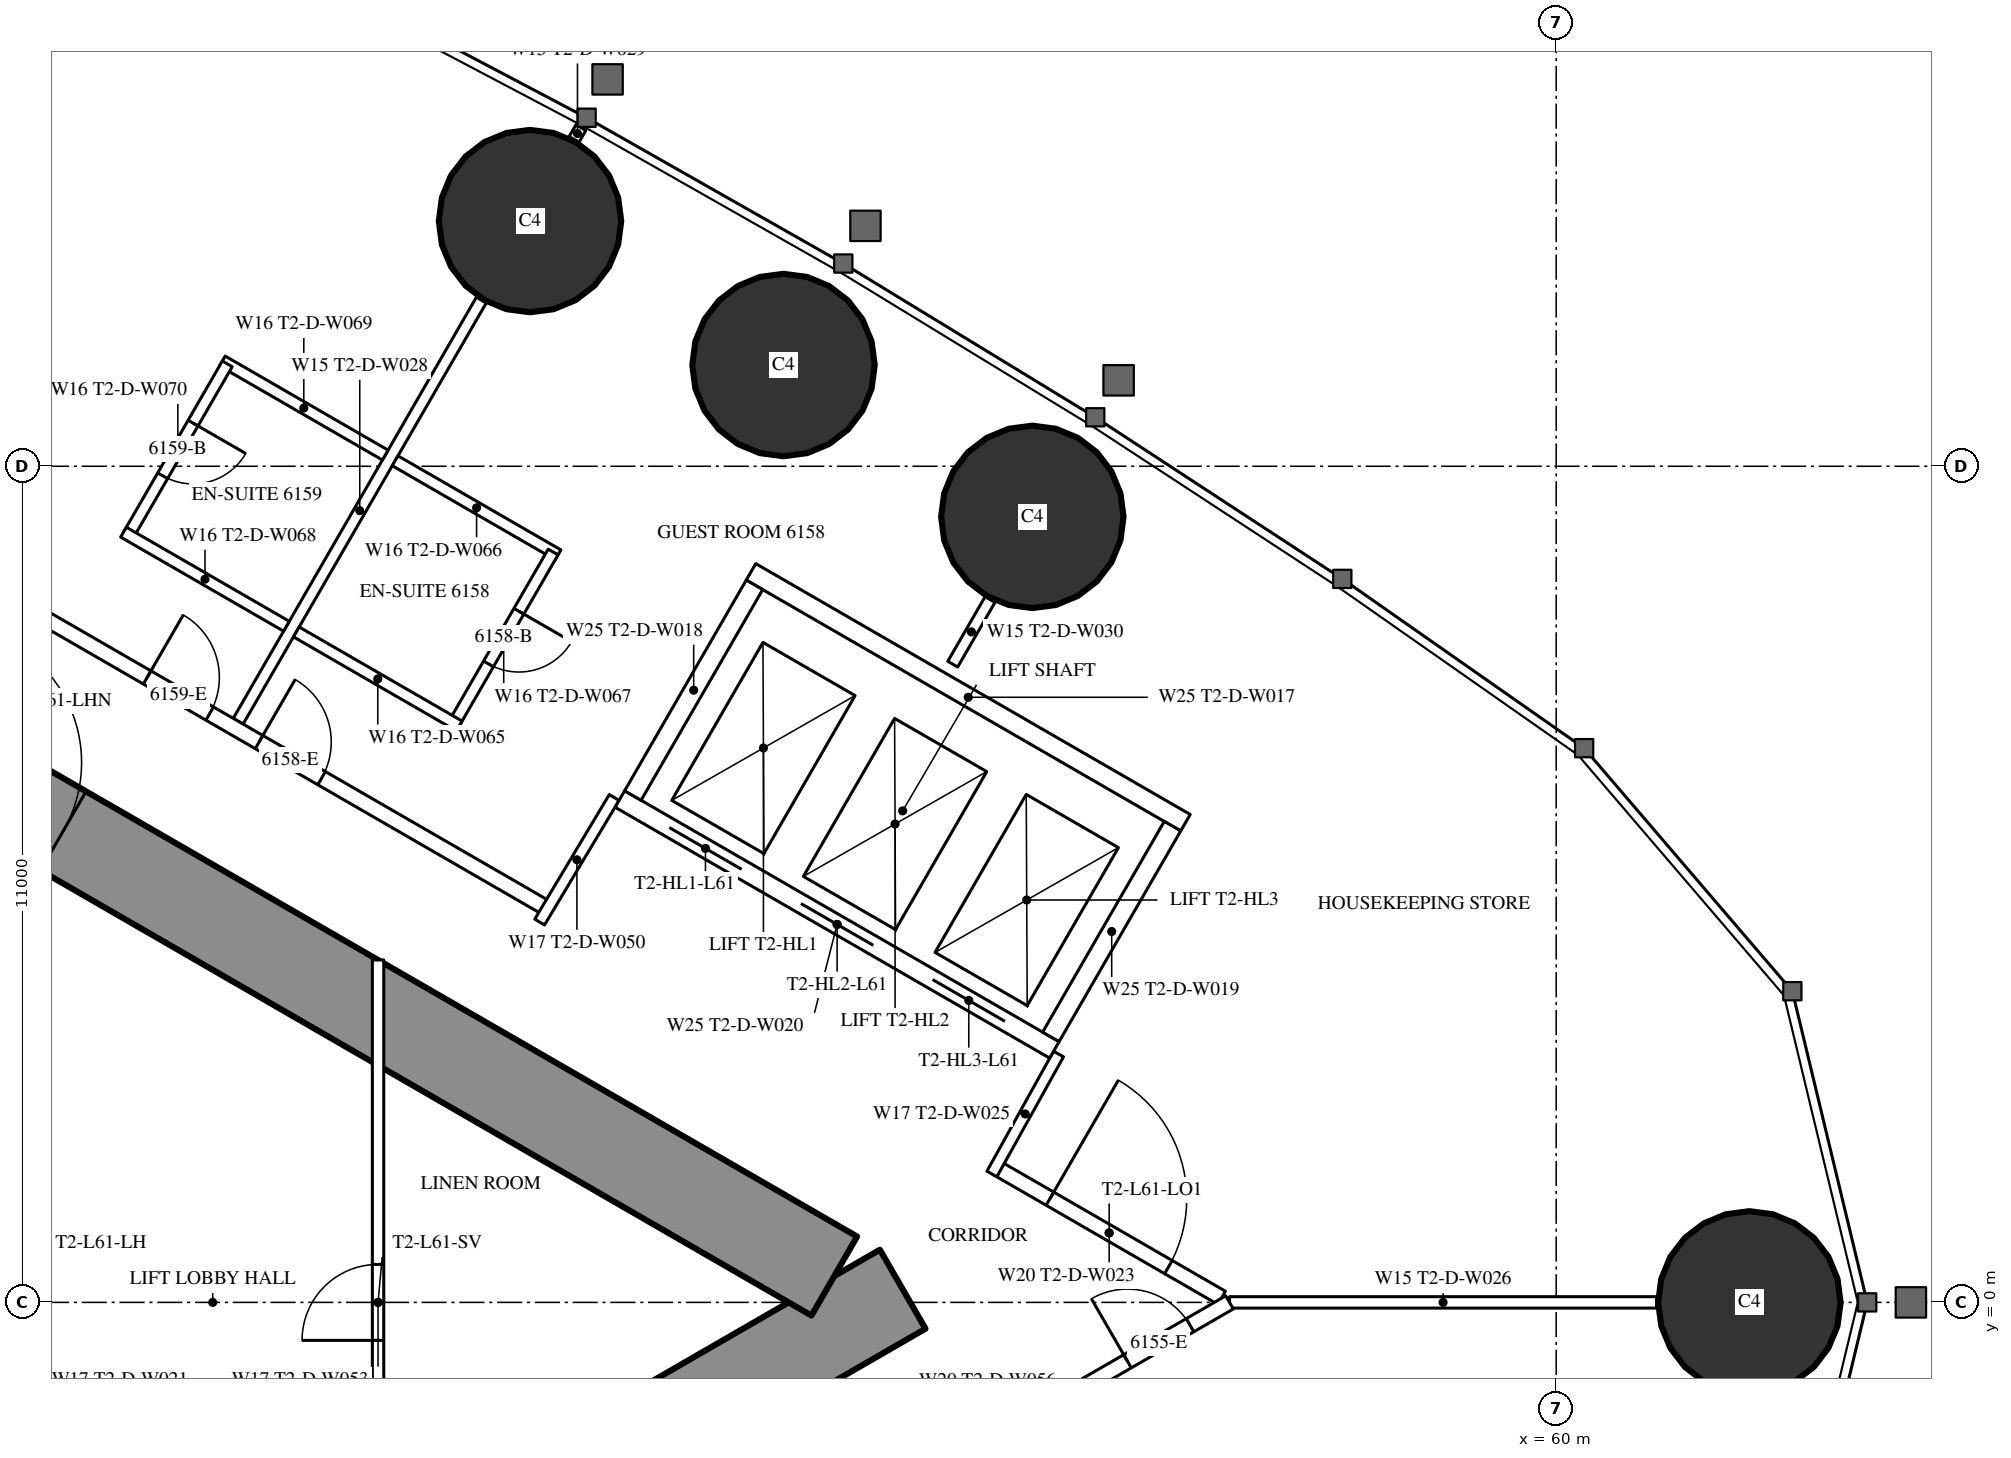
"""IFC4 building model, lengths in metres.
Left out: names, types, materials, properties, quantities, classifications, styles, units other than length and angle.
Written with IfcOpenShell. Run it as: python <this file> out.ifc"""

import sys

from ifc_helpers import new_model, si_unit, direction, frame, frame_2d, origin, origin_2d, place, context, subcontext, project, spatial, rectangle, circle, extrude, element, fill, save


model = new_model("IFC4")
c1 = context("Model", 3, precision=1e-05, world=origin(), true_north=direction((0.0, 1.0)))
c2 = subcontext(c1, "Body", "Model", "MODEL_VIEW")
j1 = project(units=[si_unit("LENGTHUNIT", "METRE"), si_unit("PLANEANGLEUNIT", "RADIAN")], contexts=[c1])
p1 = place(None, origin())
s1 = spatial("IfcSite", under=j1, at=p1, CompositionType="ELEMENT")
p2 = place(p1, origin())
s2 = spatial("IfcBuilding", under=s1, at=p2, CompositionType="ELEMENT")
p3 = place(p2, frame((0.0, 0.0, 229.7)))
s3 = spatial("IfcBuildingStorey", under=s2, at=p3, CompositionType="ELEMENT", Elevation=229.7)
for number, where, z_axis, x_axis in (
    (1, (62.542, 0.0, 0.0), (0.0, 0.0, 1.0), (1.0, 0.0, 0.0)),
    (2, (53.108, 10.334, 0.0), (0.0, 0.0, 1.0), (1.0, 0.0, 0.0)),
    (3, (49.834, 12.332, 0.0), (0.0, 0.0, 1.0), (1.0, 0.0, 0.0)),
    (4, (46.499, 14.226, 0.0), (0.0, 0.0, 1.0), (1.0, 0.0, 0.0)),
):
    element("IfcColumn", number, at=place(p3, frame(where, z_axis=z_axis, x_axis=x_axis)), inside=s3, PredefinedType="COLUMN", context=c2, shape_type="SweptSolid", body=[
        extrude(circle(Radius=1.2, at=origin_2d()), origin(), (0.0, 0.0, 1.0), 3.6),
    ])
p4 = place(p3, frame((27.2, -13.8, 0.0), z_axis=(0.0, 0.0, 1.0), x_axis=(0.866027159892, 0.499996958321, 0.0)))
e5 = element("IfcWall", 5, at=p4, inside=s3, PredefinedType="SHEAR", context=c2, shape_type="SweptSolid", body=[
    extrude(rectangle(XDim=27.947, YDim=1.2, at=frame_2d((13.973, 0.0))), origin(), (0.0, 0.0, 1.0), 3.6),
])
p5 = place(p4, frame((4.6, 0.0, 0.0)))
e6 = element("IfcOpeningElement", 6, at=p5, cuts=e5, PredefinedType="OPENING", context=c2, shape_type="SweptSolid", body=[
    extrude(rectangle(XDim=1.0, YDim=2.2, at=frame_2d((0.5, 1.1))), frame((0.0, 0.61, 0.0), z_axis=(0.0, -1.0, 0.0), x_axis=(1.0, 0.0, 0.0)), (0.0, 0.0, 1.0), 1.22),
])
p6 = place(p4, frame((13.395, 0.0, 0.0)))
e7 = element("IfcOpeningElement", 7, at=p6, cuts=e5, PredefinedType="OPENING", context=c2, shape_type="SweptSolid", body=[
    extrude(rectangle(XDim=1.8, YDim=2.2, at=frame_2d((0.9, 1.1))), frame((0.0, 0.61, 0.0), z_axis=(0.0, -1.0, 0.0), x_axis=(1.0, 0.0, 0.0)), (0.0, 0.0, 1.0), 1.22),
])
p7 = place(p3, frame((27.2, 13.8, 0.0), z_axis=(0.0, 0.0, 1.0), x_axis=(0.866024515034, -0.500001539357, 0.0)))
e8 = element("IfcWall", 8, at=p7, inside=s3, PredefinedType="SHEAR", context=c2, shape_type="SweptSolid", body=[
    extrude(rectangle(XDim=26.907, YDim=1.2, at=frame_2d((13.454, 0.0))), origin(), (0.0, 0.0, 1.0), 3.6),
])
p8 = place(p7, frame((4.6, 0.0, 0.0)))
e9 = element("IfcOpeningElement", 9, at=p8, cuts=e8, PredefinedType="OPENING", context=c2, shape_type="SweptSolid", body=[
    extrude(rectangle(XDim=1.0, YDim=2.2, at=frame_2d((0.5, 1.1))), frame((0.0, 0.61, 0.0), z_axis=(0.0, -1.0, 0.0), x_axis=(1.0, 0.0, 0.0)), (0.0, 0.0, 1.0), 1.22),
])
p9 = place(p7, frame((13.395, 0.0, 0.0)))
e10 = element("IfcOpeningElement", 10, at=p9, cuts=e8, PredefinedType="OPENING", context=c2, shape_type="SweptSolid", body=[
    extrude(rectangle(XDim=1.8, YDim=2.2, at=frame_2d((0.9, 1.1))), frame((0.0, 0.61, 0.0), z_axis=(0.0, -1.0, 0.0), x_axis=(1.0, 0.0, 0.0)), (0.0, 0.0, 1.0), 1.22),
])
p10 = place(p3, frame((42.66, 7.646, 0.0), z_axis=(0.0, 0.0, 1.0), x_axis=(0.499996592859, 0.866027370889, 0.0)))
e11 = element("IfcWall", 11, at=p10, inside=s3, PredefinedType="PARTITIONING", context=c2, shape_type="SweptSolid", body=[
    extrude(rectangle(XDim=6.398, YDim=0.15, at=frame_2d((3.199, 0.0))), origin(), (0.0, 0.0, 1.0), 2.45),
])
p11 = place(p3, frame((47.079, 15.3, 0.0), z_axis=(0.0, 0.0, 1.0), x_axis=(0.499212083968, 0.866479829667, 0.0)))
e12 = element("IfcWall", 12, at=p11, inside=s3, PredefinedType="PARTITIONING", context=c2, shape_type="SweptSolid", body=[
    extrude(rectangle(XDim=0.179, YDim=0.15, at=frame_2d((0.09, 0.0))), origin(), (0.0, 0.0, 1.0), 2.45),
])
p12 = place(p3, frame((55.702, 0.0, 0.0), z_axis=(0.0, 0.0, 1.0), x_axis=(1.0, 0.0, 0.0)))
e13 = element("IfcWall", 13, at=p12, inside=s3, PredefinedType="PARTITIONING", context=c2, shape_type="SweptSolid", body=[
    extrude(rectangle(XDim=5.619, YDim=0.15, at=frame_2d((2.81, 0.0))), origin(), (0.0, 0.0, 1.0), 2.45),
])
p13 = place(p3, frame((52.06, 8.396, 0.0), z_axis=(0.0, 0.0, 1.0), x_axis=(0.500095379624, 0.865970329329, 0.0)))
e14 = element("IfcWall", 14, at=p13, inside=s3, PredefinedType="PARTITIONING", context=c2, shape_type="SweptSolid", body=[
    extrude(rectangle(XDim=0.982, YDim=0.15, at=frame_2d((0.491, 0.0))), origin(), (0.0, 0.0, 1.0), 3.35),
])
p14 = place(p3, frame((28.959, 15.44, 0.0), z_axis=(0.0, 0.0, 1.0), x_axis=(0.866028936079, -0.499993881836, 0.0)))
e15 = element("IfcWall", 15, at=p14, inside=s3, PredefinedType="PARTITIONING", context=c2, shape_type="SweptSolid", body=[
    extrude(rectangle(XDim=20.503, YDim=0.2, at=frame_2d((10.251, 0.0))), origin(), (0.0, 0.0, 1.0), 3.35),
])
p15 = place(p14, frame((16.137, 0.0, 0.0)))
e16 = element("IfcOpeningElement", 16, at=p15, cuts=e15, PredefinedType="OPENING", context=c2, shape_type="SweptSolid", body=[
    extrude(rectangle(XDim=0.95, YDim=2.2, at=frame_2d((0.475, 1.1))), frame((0.0, 0.11, 0.0), z_axis=(0.0, -1.0, 0.0), x_axis=(1.0, 0.0, 0.0)), (0.0, 0.0, 1.0), 0.22),
])
p16 = place(p14, frame((14.437, 0.0, 0.0)))
e17 = element("IfcOpeningElement", 17, at=p16, cuts=e15, PredefinedType="OPENING", context=c2, shape_type="SweptSolid", body=[
    extrude(rectangle(XDim=0.95, YDim=2.2, at=frame_2d((0.475, 1.1))), frame((0.0, 0.11, 0.0), z_axis=(0.0, -1.0, 0.0), x_axis=(1.0, 0.0, 0.0)), (0.0, 0.0, 1.0), 0.22),
])
p17 = place(p14, frame((2.244, 0.0, 0.0)))
e18 = element("IfcOpeningElement", 18, at=p17, cuts=e15, PredefinedType="OPENING", context=c2, shape_type="SweptSolid", body=[
    extrude(rectangle(XDim=1.8, YDim=2.04, at=frame_2d((0.9, 1.02))), frame((0.0, 0.11, 0.0), z_axis=(0.0, -1.0, 0.0), x_axis=(1.0, 0.0, 0.0)), (0.0, 0.0, 1.0), 0.22),
])
p18 = place(p3, frame((52.639, 1.769, 0.0), z_axis=(0.0, 0.0, 1.0), x_axis=(0.866027340901, -0.4999966448, 0.0)))
e19 = element("IfcWall", 19, at=p18, inside=s3, PredefinedType="PARTITIONING", context=c2, shape_type="SweptSolid", body=[
    extrude(rectangle(XDim=3.417, YDim=0.2, at=frame_2d((1.708, 0.0))), origin(), (0.0, 0.0, 1.0), 3.35),
])
p19 = place(p18, frame((0.809, 0.0, 0.0)))
e20 = element("IfcOpeningElement", 20, at=p19, cuts=e19, PredefinedType="OPENING", context=c2, shape_type="SweptSolid", body=[
    extrude(rectangle(XDim=1.8, YDim=2.2, at=frame_2d((0.9, 1.1))), frame((0.0, 0.11, 0.0), z_axis=(0.0, -1.0, 0.0), x_axis=(1.0, 0.0, 0.0)), (0.0, 0.0, 1.0), 0.22),
])
p20 = place(p3, frame((47.606, 6.642, 0.0), z_axis=(0.0, 0.0, 1.0), x_axis=(-0.51353662755, -0.858067673418, 0.0)))
e21 = element("IfcWall", 21, at=p20, inside=s3, PredefinedType="PARTITIONING", context=c2, shape_type="SweptSolid", body=[
    extrude(rectangle(XDim=1.91, YDim=0.15, at=frame_2d((0.955, 0.0))), origin(), (0.0, 0.0, 1.0), 3.35),
])
p21 = place(p3, frame((52.576, 1.689, 0.0), z_axis=(0.0, 0.0, 1.0), x_axis=(0.485424724123, 0.874278466629, 0.0)))
e22 = element("IfcWall", 22, at=p21, inside=s3, PredefinedType="PARTITIONING", context=c2, shape_type="SweptSolid", body=[
    extrude(rectangle(XDim=1.805, YDim=0.15, at=frame_2d((0.903, 0.0))), origin(), (0.0, 0.0, 1.0), 3.35),
])
p22 = place(p3, frame((44.725, 11.072, 0.0), z_axis=(0.0, 0.0, 1.0), x_axis=(0.866006523861, -0.500032699561, 0.0)))
e23 = element("IfcWall", 23, at=p22, inside=s3, PredefinedType="PARTITIONING", context=c2, shape_type="SweptSolid", body=[
    extrude(rectangle(XDim=2.475, YDim=0.15, at=frame_2d((1.237, 0.0))), origin(), (0.0, 0.0, 1.0), 3.35),
])
p23 = place(p3, frame((45.503, 7.621, 0.0), z_axis=(0.0, 0.0, 1.0), x_axis=(0.500006934395, 0.866021400173, 0.0)))
e24 = element("IfcWall", 24, at=p23, inside=s3, PredefinedType="PARTITIONING", context=c2, shape_type="SweptSolid", body=[
    extrude(rectangle(XDim=2.6, YDim=0.15, at=frame_2d((1.3, 0.0))), origin(), (0.0, 0.0, 1.0), 3.35),
])
p24 = place(p23, frame((0.9, 0.0, 0.0)))
e25 = element("IfcOpeningElement", 25, at=p24, cuts=e24, PredefinedType="OPENING", context=c2, shape_type="SweptSolid", body=[
    extrude(rectangle(XDim=0.8, YDim=2.2, at=frame_2d((0.4, 1.1))), frame((0.0, 0.085, 0.0), z_axis=(0.0, -1.0, 0.0), x_axis=(1.0, 0.0, 0.0)), (0.0, 0.0, 1.0), 0.17),
])
p25 = place(p3, frame((43.425, 8.821, 0.0), z_axis=(0.0, 0.0, 1.0), x_axis=(0.866006523861, -0.500032699561, 0.0)))
e26 = element("IfcWall", 26, at=p25, inside=s3, PredefinedType="PARTITIONING", context=c2, shape_type="SweptSolid", body=[
    extrude(rectangle(XDim=2.475, YDim=0.15, at=frame_2d((1.237, 0.0))), origin(), (0.0, 0.0, 1.0), 2.5),
])
p26 = place(p3, frame((42.451, 12.385, 0.0), z_axis=(0.0, 0.0, 1.0), x_axis=(0.866031185235, -0.4999899861, 0.0)))
e27 = element("IfcWall", 27, at=p26, inside=s3, PredefinedType="PARTITIONING", context=c2, shape_type="SweptSolid", body=[
    extrude(rectangle(XDim=2.475, YDim=0.15, at=frame_2d((1.238, 0.0))), origin(), (0.0, 0.0, 1.0), 3.35),
])
p27 = place(p3, frame((41.216, 10.095, 0.0), z_axis=(0.0, 0.0, 1.0), x_axis=(0.499936506574, 0.866062058628, 0.0)))
e28 = element("IfcWall", 28, at=p27, inside=s3, PredefinedType="PARTITIONING", context=c2, shape_type="SweptSolid", body=[
    extrude(rectangle(XDim=2.6, YDim=0.15, at=frame_2d((1.3, 0.0))), origin(), (0.0, 0.0, 1.0), 3.35),
])
p28 = place(p27, frame((0.9, 0.0, 0.0)))
e29 = element("IfcOpeningElement", 29, at=p28, cuts=e28, PredefinedType="OPENING", context=c2, shape_type="SweptSolid", body=[
    extrude(rectangle(XDim=0.8, YDim=2.2, at=frame_2d((0.4, 1.1))), frame((0.0, 0.085, 0.0), z_axis=(0.0, -1.0, 0.0), x_axis=(1.0, 0.0, 0.0)), (0.0, 0.0, 1.0), 0.17),
])
p29 = place(p3, frame((41.151, 10.133, 0.0), z_axis=(0.0, 0.0, 1.0), x_axis=(0.866006523861, -0.500032699561, 0.0)))
e30 = element("IfcWall", 30, at=p29, inside=s3, PredefinedType="PARTITIONING", context=c2, shape_type="SweptSolid", body=[
    extrude(rectangle(XDim=2.475, YDim=0.15, at=frame_2d((1.237, 0.0))), origin(), (0.0, 0.0, 1.0), 2.5),
])
p30 = place(p3, frame((49.335, -3.676, 0.0), z_axis=(0.0, 0.0, 1.0), x_axis=(0.866021344046, 0.500007031608, 0.0)))
e31 = element("IfcWall", 31, at=p30, inside=s3, PredefinedType="PARTITIONING", context=c2, shape_type="SweptSolid", body=[
    extrude(rectangle(XDim=7.352, YDim=0.2, at=frame_2d((3.676, 0.0))), origin(), (0.0, 0.0, 1.0), 3.35),
])
p31 = place(p30, frame((5.802, 0.0, 0.0)))
e32 = element("IfcOpeningElement", 32, at=p31, cuts=e31, PredefinedType="OPENING", context=c2, shape_type="SweptSolid", body=[
    extrude(rectangle(XDim=0.95, YDim=2.2, at=frame_2d((0.475, 1.1))), frame((0.0, 0.11, 0.0), z_axis=(0.0, -1.0, 0.0), x_axis=(1.0, 0.0, 0.0)), (0.0, 0.0, 1.0), 0.22),
])
p32 = place(p3, frame((44.5, -4.505, 0.0), z_axis=(0.0, 0.0, 1.0), x_axis=(0.0, 1.0, 0.0)))
e33 = element("IfcWall", 33, at=p32, inside=s3, PredefinedType="PARTITIONING", context=c2, shape_type="SweptSolid", body=[
    extrude(rectangle(XDim=9.009, YDim=0.15, at=frame_2d((4.505, 0.0))), origin(), (0.0, 0.0, 1.0), 3.35),
])
p33 = place(p32, frame((4.005, 0.0, 0.0)))
e34 = element("IfcOpeningElement", 34, at=p33, cuts=e33, PredefinedType="OPENING", context=c2, shape_type="SweptSolid", body=[
    extrude(rectangle(XDim=1.0, YDim=2.2, at=frame_2d((0.5, 1.1))), frame((0.0, 0.085, 0.0), z_axis=(0.0, -1.0, 0.0), x_axis=(1.0, 0.0, 0.0)), (0.0, 0.0, 1.0), 0.17),
])
p34 = place(p3, frame((47.681, 6.622, 0.0), z_axis=(0.0, 0.0, 1.0), x_axis=(0.86603344179, -0.499986077507, 0.0)))
e35 = element("IfcWall", 35, at=p34, inside=s3, PredefinedType="PARTITIONING", context=c2, shape_type="SweptSolid", body=[
    extrude(rectangle(XDim=6.6, YDim=0.25, at=frame_2d((3.3, 0.0))), origin(), (0.0, 0.0, 1.0), 3.35),
])
p35 = place(p34, frame((0.75, 0.0, 0.0)))
e36 = element("IfcOpeningElement", 36, at=p35, cuts=e35, PredefinedType="OPENING", context=c2, shape_type="SweptSolid", body=[
    extrude(rectangle(XDim=1.1, YDim=2.2, at=frame_2d((0.55, 1.1))), frame((0.0, 0.135, 0.0), z_axis=(0.0, -1.0, 0.0), x_axis=(1.0, 0.0, 0.0)), (0.0, 0.0, 1.0), 0.27),
])
p36 = place(p34, frame((2.75, 0.0, 0.0)))
e37 = element("IfcOpeningElement", 37, at=p36, cuts=e35, PredefinedType="OPENING", context=c2, shape_type="SweptSolid", body=[
    extrude(rectangle(XDim=1.1, YDim=2.2, at=frame_2d((0.55, 1.1))), frame((0.0, 0.135, 0.0), z_axis=(0.0, -1.0, 0.0), x_axis=(1.0, 0.0, 0.0)), (0.0, 0.0, 1.0), 0.27),
])
p37 = place(p34, frame((4.75, 0.0, 0.0)))
e38 = element("IfcOpeningElement", 38, at=p37, cuts=e35, PredefinedType="OPENING", context=c2, shape_type="SweptSolid", body=[
    extrude(rectangle(XDim=1.1, YDim=2.2, at=frame_2d((0.55, 1.1))), frame((0.0, 0.135, 0.0), z_axis=(0.0, -1.0, 0.0), x_axis=(1.0, 0.0, 0.0)), (0.0, 0.0, 1.0), 0.27),
])
p38 = place(p3, frame((49.406, 9.611, 0.0), z_axis=(0.0, 0.0, 1.0), x_axis=(0.86603344179, -0.499986077507, 0.0)))
e39 = element("IfcWall", 39, at=p38, inside=s3, PredefinedType="PARTITIONING", context=c2, shape_type="SweptSolid", body=[
    extrude(rectangle(XDim=6.6, YDim=0.25, at=frame_2d((3.3, 0.0))), origin(), (0.0, 0.0, 1.0), 3.35),
])
p39 = place(p3, frame((47.852, 6.668, 0.0), z_axis=(0.0, 0.0, 1.0), x_axis=(0.499929347863, 0.866066190972, 0.0)))
e40 = element("IfcWall", 40, at=p39, inside=s3, PredefinedType="PARTITIONING", context=c2, shape_type="SweptSolid", body=[
    extrude(rectangle(XDim=3.201, YDim=0.25, at=frame_2d((1.6, 0.0))), origin(), (0.0, 0.0, 1.0), 3.35),
])
p40 = place(p3, frame((53.352, 3.493, 0.0), z_axis=(0.0, 0.0, 1.0), x_axis=(0.499872130319, 0.866099216793, 0.0)))
e41 = element("IfcWall", 41, at=p40, inside=s3, PredefinedType="PARTITIONING", context=c2, shape_type="SweptSolid", body=[
    extrude(rectangle(XDim=3.2, YDim=0.25, at=frame_2d((1.6, 0.0))), origin(), (0.0, 0.0, 1.0), 3.35),
])
p41 = place(p31, origin())
e42 = element("IfcDoor", 42, at=p41, inside=s3, OperationType="SINGLE_SWING_LEFT", PredefinedType="DOOR", context=c2, shape_type="SweptSolid", body=[
    extrude(rectangle(XDim=0.95, YDim=2.2, at=frame_2d((0.475, 1.1))), frame((0.0, 0.025, 0.0), z_axis=(0.0, -1.0, 0.0), x_axis=(1.0, 0.0, 0.0)), (0.0, 0.0, 1.0), 0.05),
])
fill(e32, e42)
p42 = place(p24, origin())
e43 = element("IfcDoor", 43, at=p42, inside=s3, OperationType="SINGLE_SWING_RIGHT", PredefinedType="DOOR", context=c2, shape_type="SweptSolid", body=[
    extrude(rectangle(XDim=0.8, YDim=2.2, at=frame_2d((0.4, 1.1))), frame((0.0, 0.025, 0.0), z_axis=(0.0, -1.0, 0.0), x_axis=(1.0, 0.0, 0.0)), (0.0, 0.0, 1.0), 0.05),
])
fill(e25, e43)
p43 = place(p15, origin())
e44 = element("IfcDoor", 44, at=p43, inside=s3, OperationType="SINGLE_SWING_LEFT", PredefinedType="DOOR", context=c2, shape_type="SweptSolid", body=[
    extrude(rectangle(XDim=0.95, YDim=2.2, at=frame_2d((0.475, 1.1))), frame((0.0, 0.025, 0.0), z_axis=(0.0, -1.0, 0.0), x_axis=(1.0, 0.0, 0.0)), (0.0, 0.0, 1.0), 0.05),
])
fill(e16, e44)
p44 = place(p28, origin())
e45 = element("IfcDoor", 45, at=p44, inside=s3, OperationType="SINGLE_SWING_RIGHT", PredefinedType="DOOR", context=c2, shape_type="SweptSolid", body=[
    extrude(rectangle(XDim=0.8, YDim=2.2, at=frame_2d((0.4, 1.1))), frame((0.0, 0.025, 0.0), z_axis=(0.0, -1.0, 0.0), x_axis=(1.0, 0.0, 0.0)), (0.0, 0.0, 1.0), 0.05),
])
fill(e29, e45)
p45 = place(p16, origin())
e46 = element("IfcDoor", 46, at=p45, inside=s3, OperationType="SINGLE_SWING_LEFT", PredefinedType="DOOR", context=c2, shape_type="SweptSolid", body=[
    extrude(rectangle(XDim=0.95, YDim=2.2, at=frame_2d((0.475, 1.1))), frame((0.0, 0.025, 0.0), z_axis=(0.0, -1.0, 0.0), x_axis=(1.0, 0.0, 0.0)), (0.0, 0.0, 1.0), 0.05),
])
fill(e17, e46)
p46 = place(p19, origin())
e47 = element("IfcDoor", 47, at=p46, inside=s3, OperationType="DOUBLE_DOOR_SINGLE_SWING", PredefinedType="DOOR", context=c2, shape_type="SweptSolid", body=[
    extrude(rectangle(XDim=1.8, YDim=2.2, at=frame_2d((0.9, 1.1))), frame((0.0, 0.025, 0.0), z_axis=(0.0, -1.0, 0.0), x_axis=(1.0, 0.0, 0.0)), (0.0, 0.0, 1.0), 0.05),
])
fill(e20, e47)
p47 = place(p33, origin())
e48 = element("IfcDoor", 48, at=p47, inside=s3, OperationType="SINGLE_SWING_LEFT", PredefinedType="DOOR", context=c2, shape_type="SweptSolid", body=[
    extrude(rectangle(XDim=1.0, YDim=2.2, at=frame_2d((0.5, 1.1))), frame((0.0, 0.025, 0.0), z_axis=(0.0, -1.0, 0.0), x_axis=(1.0, 0.0, 0.0)), (0.0, 0.0, 1.0), 0.05),
])
fill(e34, e48)
p48 = place(p9, origin())
e49 = element("IfcDoor", 49, at=p48, inside=s3, OperationType="DOUBLE_DOOR_SINGLE_SWING", PredefinedType="DOOR", context=c2, shape_type="SweptSolid", body=[
    extrude(rectangle(XDim=1.8, YDim=2.2, at=frame_2d((0.9, 1.1))), frame((0.0, 0.025, 0.0), z_axis=(0.0, -1.0, 0.0), x_axis=(1.0, 0.0, 0.0)), (0.0, 0.0, 1.0), 0.05),
])
fill(e10, e49)
p49 = place(p35, origin())
e50 = element("IfcDoor", 50, at=p49, inside=s3, OperationType="DOUBLE_DOOR_SLIDING", PredefinedType="USERDEFINED", context=c2, shape_type="SweptSolid", body=[
    extrude(rectangle(XDim=1.1, YDim=2.2, at=frame_2d((0.55, 1.1))), frame((0.0, 0.025, 0.0), z_axis=(0.0, -1.0, 0.0), x_axis=(1.0, 0.0, 0.0)), (0.0, 0.0, 1.0), 0.05),
])
fill(e36, e50)
p50 = place(p36, origin())
e51 = element("IfcDoor", 51, at=p50, inside=s3, OperationType="DOUBLE_DOOR_SLIDING", PredefinedType="USERDEFINED", context=c2, shape_type="SweptSolid", body=[
    extrude(rectangle(XDim=1.1, YDim=2.2, at=frame_2d((0.55, 1.1))), frame((0.0, 0.025, 0.0), z_axis=(0.0, -1.0, 0.0), x_axis=(1.0, 0.0, 0.0)), (0.0, 0.0, 1.0), 0.05),
])
fill(e37, e51)
p51 = place(p37, origin())
e52 = element("IfcDoor", 52, at=p51, inside=s3, OperationType="DOUBLE_DOOR_SLIDING", PredefinedType="USERDEFINED", context=c2, shape_type="SweptSolid", body=[
    extrude(rectangle(XDim=1.1, YDim=2.2, at=frame_2d((0.55, 1.1))), frame((0.0, 0.025, 0.0), z_axis=(0.0, -1.0, 0.0), x_axis=(1.0, 0.0, 0.0)), (0.0, 0.0, 1.0), 0.05),
])
fill(e38, e52)
save(model, sys.argv[1])
